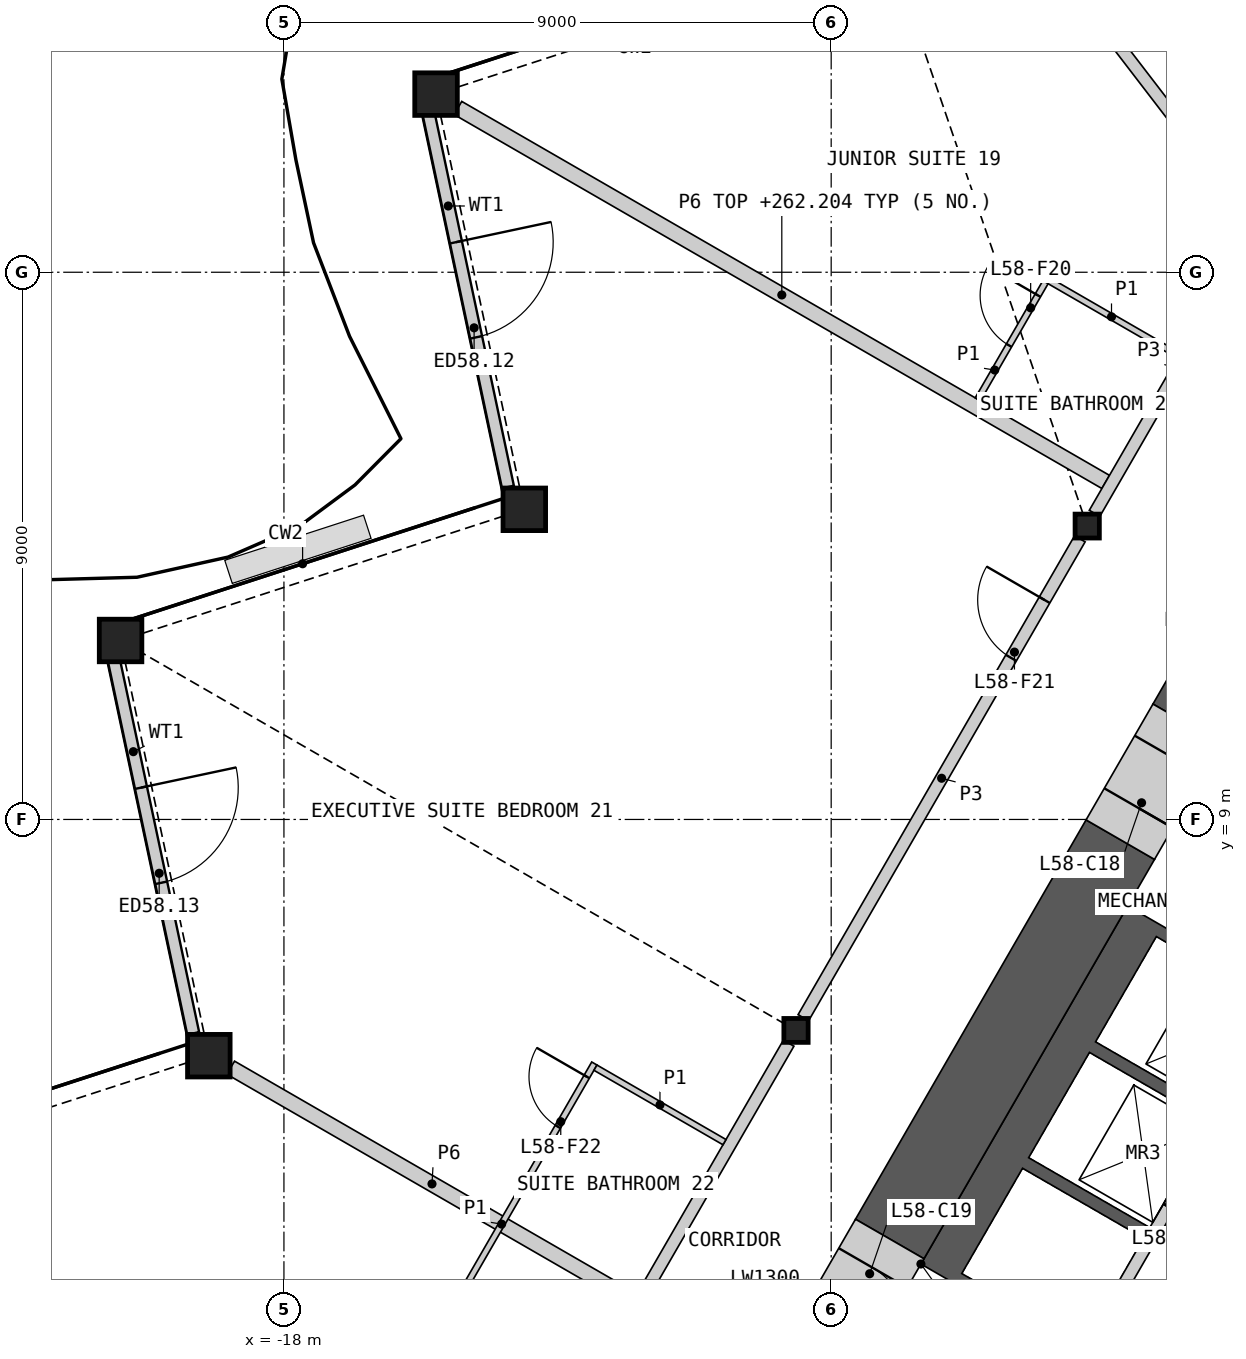
"""IFC4 building model, lengths in metres.
Left out: names, types, materials, properties, quantities, classifications, styles, units other than length and angle.
Written with IfcOpenShell. Run it as: python <this file> out.ifc"""

import sys

from ifc_helpers import new_model, si_unit, direction, frame, frame_2d, origin, origin_2d, place, context, subcontext, project, spatial, polyline, rectangle, hollow_rectangle, i_section, outline, extrude, element, fill, save


model = new_model("IFC4")
c1 = context("Model", 3, precision=1e-05, world=origin(), true_north=direction((0.0, 1.0)))
c2 = subcontext(c1, "Body", "Model", "MODEL_VIEW")
j1 = project(units=[si_unit("LENGTHUNIT", "METRE"), si_unit("PLANEANGLEUNIT", "RADIAN")], contexts=[c1])
p1 = place(None, origin())
s1 = spatial("IfcSite", under=j1, at=p1, CompositionType="ELEMENT")
p2 = place(p1, origin())
s2 = spatial("IfcBuilding", under=s1, at=p2, CompositionType="ELEMENT")
p3 = place(p2, frame((0.0, 0.0, 259.8)))
s3 = spatial("IfcBuildingStorey", under=s2, at=p3, CompositionType="ELEMENT", Elevation=259.8)
for number, where, z_axis, x_axis in (
    (1, (-15.499, 20.93, 0.0), (0.0, 0.0, 1.0), (1.0, 0.0, 0.0)),
    (2, (-14.047, 14.101, 0.0), (0.0, 0.0, 1.0), (1.0, 0.0, 0.0)),
    (3, (-20.687, 11.943, 0.0), (0.0, 0.0, 1.0), (1.0, 0.0, 0.0)),
    (4, (-19.235, 5.115, 0.0), (0.0, 0.0, 1.0), (1.0, 0.0, 0.0)),
):
    element("IfcColumn", number, at=place(p3, frame(where, z_axis=z_axis, x_axis=x_axis)), inside=s3, PredefinedType="COLUMN", context=c2, shape_type="SweptSolid", body=[
        extrude(hollow_rectangle(XDim=0.7, YDim=0.7, WallThickness=0.045, at=origin_2d()), origin(), (0.0, 0.0, 1.0), 3.6),
    ])
for number, where, z_axis, x_axis in (
    (5, (-4.789, 13.825, 0.0), (0.0, 0.0, 1.0), (1.0, 0.0, 0.0)),
    (6, (-9.578, 5.53, 0.0), (0.0, 0.0, 1.0), (1.0, 0.0, 0.0)),
):
    element("IfcColumn", number, at=place(p3, frame(where, z_axis=z_axis, x_axis=x_axis)), inside=s3, PredefinedType="COLUMN", context=c2, shape_type="SweptSolid", body=[
        extrude(i_section(OverallWidth=0.399, OverallDepth=0.393, WebThickness=0.023, FlangeThickness=0.037, at=origin_2d()), origin(), (0.0, 0.0, 1.0), 3.6),
    ])
p4 = place(p3, frame((-15.626, 20.631, 0.0), z_axis=(0.0, 0.0, 1.0), x_axis=(0.207882853761, -0.978153729795, 0.0)))
e7 = element("IfcWall", 7, at=p4, inside=s3, PredefinedType="SOLIDWALL", context=c2, shape_type="SweptSolid", body=[
    extrude(rectangle(XDim=6.301, YDim=0.2, at=frame_2d((3.15, 0.0))), origin(), (0.0, 0.0, 1.0), 2.701),
])
p5 = place(p4, frame((2.184, 0.0, 0.0)))
e8 = element("IfcOpeningElement", 8, at=p5, cuts=e7, PredefinedType="OPENING", context=c2, shape_type="SweptSolid", body=[
    extrude(rectangle(XDim=1.6, YDim=2.4, at=frame_2d((0.8, 1.2))), frame((0.0, 0.11, 0.0), z_axis=(0.0, -1.0, 0.0), x_axis=(1.0, 0.0, 0.0)), (0.0, 0.0, 1.0), 0.22),
])
p6 = place(p3, frame((-20.805, 11.659, 0.0), z_axis=(0.0, 0.0, 1.0), x_axis=(0.207913305093, -0.978147257608, 0.0)))
e9 = element("IfcWall", 9, at=p6, inside=s3, PredefinedType="SOLIDWALL", context=c2, shape_type="SweptSolid", body=[
    extrude(rectangle(XDim=6.316, YDim=0.2, at=frame_2d((3.158, 0.0))), origin(), (0.0, 0.0, 1.0), 2.701),
])
p7 = place(p6, frame((2.184, 0.0, 0.0)))
e10 = element("IfcOpeningElement", 10, at=p7, cuts=e9, PredefinedType="OPENING", context=c2, shape_type="SweptSolid", body=[
    extrude(rectangle(XDim=1.6, YDim=2.4, at=frame_2d((0.8, 1.2))), frame((0.0, 0.11, 0.0), z_axis=(0.0, -1.0, 0.0), x_axis=(1.0, 0.0, 0.0)), (0.0, 0.0, 1.0), 0.22),
])
p8 = place(p3, origin())
e11 = element("IfcWall", 11, at=p8, inside=s3, PredefinedType="SHEAR", context=c2, shape_type="SweptSolid", body=[
    extrude(outline(polyline([(-7.524, 1.688), (-4.124, 7.577), (-3.731, 7.35), (-1.561, 6.097), (-1.66, 5.924), (-3.652, 7.074), (-4.652, 5.342), (-2.66, 4.192), (-2.76, 4.019), (-4.752, 5.169), (-5.752, 3.437), (-3.76, 2.287), (-3.861, 2.113), (-5.852, 3.263), (-6.852, 1.531), (-4.861, 0.381), (-4.96, 0.208), (-7.131, 1.461), (-7.524, 1.688)])), origin(), (0.0, 0.0, 1.0), 3.25),
])
p9 = place(p3, frame((-1.631, 5.776, 0.0), z_axis=(0.0, 0.0, 1.0), x_axis=(-0.499992876559, -0.866029516466, 0.0)))
e12 = element("IfcWall", 12, at=p9, inside=s3, PredefinedType="SOLIDWALL", context=c2, shape_type="SweptSolid", body=[
    extrude(rectangle(XDim=6.486, YDim=0.2, at=frame_2d((3.243, 0.0))), origin(), (0.0, 0.0, 1.0), 3.25),
])
p10 = place(p9, frame((0.337, 0.0, 0.0)))
e13 = element("IfcOpeningElement", 13, at=p10, cuts=e12, PredefinedType="OPENING", context=c2, shape_type="SweptSolid", body=[
    extrude(rectangle(XDim=1.1, YDim=2.1, at=frame_2d((0.55, 1.05))), frame((0.0, 0.11, 0.0), z_axis=(0.0, -1.0, 0.0), x_axis=(1.0, 0.0, 0.0)), (0.0, 0.0, 1.0), 0.22),
])
p11 = place(p9, frame((2.537, 0.0, 0.0)))
e14 = element("IfcOpeningElement", 14, at=p11, cuts=e12, PredefinedType="OPENING", context=c2, shape_type="SweptSolid", body=[
    extrude(rectangle(XDim=1.1, YDim=2.1, at=frame_2d((0.55, 1.05))), frame((0.0, 0.11, 0.0), z_axis=(0.0, -1.0, 0.0), x_axis=(1.0, 0.0, 0.0)), (0.0, 0.0, 1.0), 0.22),
])
p12 = place(p3, frame((-4.245, 8.668, 0.0), z_axis=(0.0, 0.0, 1.0), x_axis=(-0.500002971097, -0.866023688414, 0.0)))
e15 = element("IfcWall", 15, at=p12, inside=s3, PredefinedType="SHEAR", context=c2, shape_type="SweptSolid", body=[
    extrude(rectangle(XDim=7.584, YDim=1.3, at=frame_2d((3.792, 0.0))), origin(), (0.0, 0.0, 1.0), 3.25),
])
p13 = place(p3, frame((-0.563, 15.045, 0.0), z_axis=(0.0, 0.0, 1.0), x_axis=(-0.499982995661, -0.866035221021, 0.0)))
e16 = element("IfcWall", 16, at=p13, inside=s3, PredefinedType="SHEAR", context=c2, shape_type="SweptSolid", body=[
    extrude(rectangle(XDim=5.164, YDim=1.3, at=frame_2d((2.582, 0.0))), origin(), (0.0, 0.0, 1.0), 3.25),
])
p14 = place(p3, frame((-3.145, 10.573, 0.0), z_axis=(0.0, 0.0, 1.0), x_axis=(-0.50002983664, -0.866008176907, 0.0)))
e17 = element("IfcWall", 17, at=p14, inside=s3, PredefinedType="SHEAR", context=c2, shape_type="SweptSolid", body=[
    extrude(rectangle(XDim=2.2, YDim=1.3, at=frame_2d((1.1, 0.0))), origin(), (0.0, 0.0, 1.0), 3.25),
])
p15 = place(p14, frame((0.6, 0.0, 0.0)))
e18 = element("IfcOpeningElement", 18, at=p15, cuts=e17, PredefinedType="OPENING", context=c2, shape_type="SweptSolid", body=[
    extrude(rectangle(XDim=1.0, YDim=2.1, at=frame_2d((0.5, 1.05))), frame((0.0, 0.66, 0.0), z_axis=(0.0, -1.0, 0.0), x_axis=(1.0, 0.0, 0.0)), (0.0, 0.0, 1.0), 1.32),
])
p16 = place(p3, frame((-8.037, 2.1, 0.0), z_axis=(0.0, 0.0, 1.0), x_axis=(-0.50002983664, -0.866008176907, 0.0)))
e19 = element("IfcWall", 19, at=p16, inside=s3, PredefinedType="SHEAR", context=c2, shape_type="SweptSolid", body=[
    extrude(rectangle(XDim=2.2, YDim=1.3, at=frame_2d((1.1, 0.0))), origin(), (0.0, 0.0, 1.0), 3.25),
])
p17 = place(p16, frame((0.55, 0.0, 0.0)))
e20 = element("IfcOpeningElement", 20, at=p17, cuts=e19, PredefinedType="OPENING", context=c2, shape_type="SweptSolid", body=[
    extrude(rectangle(XDim=1.1, YDim=2.1, at=frame_2d((0.55, 1.05))), frame((0.0, 0.66, 0.0), z_axis=(0.0, -1.0, 0.0), x_axis=(1.0, 0.0, 0.0)), (0.0, 0.0, 1.0), 1.32),
])
p18 = place(p3, frame((-15.138, 20.702, 0.0), z_axis=(0.0, 0.0, 1.0), x_axis=(0.86602627735, -0.499998486937, 0.0)))
e21 = element("IfcWall", 21, at=p18, inside=s3, PredefinedType="PARTITIONING", context=c2, shape_type="SweptSolid", body=[
    extrude(rectangle(XDim=12.301, YDim=0.25, at=frame_2d((6.15, 0.0))), origin(), (0.0, 0.0, 1.0), 2.404),
])
p19 = place(p3, frame((-14.247, -2.556, 0.0), z_axis=(0.0, 0.0, 1.0), x_axis=(0.49998193945, 0.866035830797, 0.0)))
e22 = element("IfcWall", 22, at=p19, inside=s3, PredefinedType="PARTITIONING", context=c2, shape_type="SweptSolid", body=[
    extrude(rectangle(XDim=9.094, YDim=0.2, at=frame_2d((4.547, 0.0))), origin(), (0.0, 0.0, 1.0), 3.25),
])
p20 = place(p3, frame((-9.458, 5.74, 0.0), z_axis=(0.0, 0.0, 1.0), x_axis=(0.50000207303, 0.866024206917, 0.0)))
e23 = element("IfcWall", 23, at=p20, inside=s3, PredefinedType="PARTITIONING", context=c2, shape_type="SweptSolid", body=[
    extrude(rectangle(XDim=9.095, YDim=0.2, at=frame_2d((4.547, 0.0))), origin(), (0.0, 0.0, 1.0), 3.25),
])
p21 = place(p20, frame((6.833, 0.0, 0.0)))
e24 = element("IfcOpeningElement", 24, at=p21, cuts=e23, PredefinedType="OPENING", context=c2, shape_type="SweptSolid", body=[
    extrude(rectangle(XDim=1.1, YDim=2.1, at=frame_2d((0.55, 1.05))), frame((0.0, 0.11, 0.0), z_axis=(0.0, -1.0, 0.0), x_axis=(1.0, 0.0, 0.0)), (0.0, 0.0, 1.0), 0.22),
])
p22 = place(p3, frame((-18.875, 4.917, 0.0), z_axis=(0.0, 0.0, 1.0), x_axis=(0.866017519557, -0.500013655634, 0.0)))
e25 = element("IfcWall", 25, at=p22, inside=s3, PredefinedType="PARTITIONING", context=c2, shape_type="SweptSolid", body=[
    extrude(rectangle(XDim=7.644, YDim=0.25, at=frame_2d((3.822, 0.0))), origin(), (0.0, 0.0, 1.0), 2.404),
])
p23 = place(p3, frame((-4.668, 14.035, 0.0), z_axis=(0.0, 0.0, 1.0), x_axis=(0.499984524817, 0.866034338201, 0.0)))
e26 = element("IfcWall", 26, at=p23, inside=s3, PredefinedType="PARTITIONING", context=c2, shape_type="SweptSolid", body=[
    extrude(rectangle(XDim=5.51, YDim=0.2, at=frame_2d((2.755, 0.0))), origin(), (0.0, 0.0, 1.0), 3.25),
])
p24 = place(p23, frame((4.01, 0.0, 0.0)))
e27 = element("IfcOpeningElement", 27, at=p24, cuts=e26, PredefinedType="OPENING", context=c2, shape_type="SweptSolid", body=[
    extrude(rectangle(XDim=1.1, YDim=2.1, at=frame_2d((0.55, 1.05))), frame((0.0, 0.11, 0.0), z_axis=(0.0, -1.0, 0.0), x_axis=(1.0, 0.0, 0.0)), (0.0, 0.0, 1.0), 0.22),
])
p25 = place(p3, frame((-10.277, 29.556, 0.0), z_axis=(0.0, 0.0, 1.0), x_axis=(0.60876001101, -0.793354428358, 0.0)))
e28 = element("IfcWall", 28, at=p25, inside=s3, PredefinedType="PARTITIONING", context=c2, shape_type="SweptSolid", body=[
    extrude(rectangle(XDim=13.558, YDim=0.2, at=frame_2d((6.779, 0.0))), origin(), (0.0, 0.0, 1.0), 2.404),
])
p26 = place(p3, frame((-15.945, -0.297, 0.0), z_axis=(0.0, 0.0, 1.0), x_axis=(0.499978833458, 0.866037623948, 0.0)))
e29 = element("IfcWall", 29, at=p26, inside=s3, PredefinedType="PARTITIONING", context=c2, shape_type="SweptSolid", body=[
    extrude(rectangle(XDim=6.1, YDim=0.1, at=frame_2d((3.05, 0.0))), origin(), (0.0, 0.0, 1.0), 2.404),
])
p27 = place(p26, frame((4.9, 0.0, 0.0)))
e30 = element("IfcOpeningElement", 30, at=p27, cuts=e29, PredefinedType="OPENING", context=c2, shape_type="SweptSolid", body=[
    extrude(rectangle(XDim=0.95, YDim=2.1, at=frame_2d((0.475, 1.05))), frame((0.0, 0.06, 0.0), z_axis=(0.0, -1.0, 0.0), x_axis=(1.0, 0.0, 0.0)), (0.0, 0.0, 1.0), 0.12),
])
p28 = place(p26, frame((0.25, 0.0, 0.0)))
e31 = element("IfcOpeningElement", 31, at=p28, cuts=e29, PredefinedType="OPENING", context=c2, shape_type="SweptSolid", body=[
    extrude(rectangle(XDim=0.95, YDim=2.1, at=frame_2d((0.475, 1.05))), frame((0.0, 0.06, 0.0), z_axis=(0.0, -1.0, 0.0), x_axis=(1.0, 0.0, 0.0)), (0.0, 0.0, 1.0), 0.12),
])
p29 = place(p3, frame((-12.877, 4.917, 0.0), z_axis=(0.0, 0.0, 1.0), x_axis=(0.866057815567, -0.499943856944, 0.0)))
e32 = element("IfcWall", 32, at=p29, inside=s3, PredefinedType="PARTITIONING", context=c2, shape_type="SweptSolid", body=[
    extrude(rectangle(XDim=2.45, YDim=0.1, at=frame_2d((1.225, 0.0))), origin(), (0.0, 0.0, 1.0), 2.404),
])
p30 = place(p3, frame((-5.494, 17.905, 0.0), z_axis=(0.0, 0.0, 1.0), x_axis=(0.866030925526, -0.499990435942, 0.0)))
e33 = element("IfcWall", 33, at=p30, inside=s3, PredefinedType="PARTITIONING", context=c2, shape_type="SweptSolid", body=[
    extrude(rectangle(XDim=2.55, YDim=0.1, at=frame_2d((1.275, 0.0))), origin(), (0.0, 0.0, 1.0), 2.404),
])
p31 = place(p3, frame((-6.588, 15.909, 0.0), z_axis=(0.0, 0.0, 1.0), x_axis=(0.49999788721, 0.866026623601, 0.0)))
e34 = element("IfcWall", 34, at=p31, inside=s3, PredefinedType="PARTITIONING", context=c2, shape_type="SweptSolid", body=[
    extrude(rectangle(XDim=2.225, YDim=0.1, at=frame_2d((1.113, 0.0))), origin(), (0.0, 0.0, 1.0), 2.404),
])
p32 = place(p31, frame((1.025, 0.0, 0.0)))
e35 = element("IfcOpeningElement", 35, at=p32, cuts=e34, PredefinedType="OPENING", context=c2, shape_type="SweptSolid", body=[
    extrude(rectangle(XDim=0.95, YDim=2.1, at=frame_2d((0.475, 1.05))), frame((0.0, 0.06, 0.0), z_axis=(0.0, -1.0, 0.0), x_axis=(1.0, 0.0, 0.0)), (0.0, 0.0, 1.0), 0.12),
])
p33 = place(p5, origin())
e36 = element("IfcDoor", 36, at=p33, inside=s3, OperationType="DOUBLE_DOOR_SINGLE_SWING", PredefinedType="DOOR", context=c2, shape_type="SweptSolid", body=[
    extrude(rectangle(XDim=1.6, YDim=2.4, at=frame_2d((0.8, 1.2))), frame((0.0, 0.025, 0.0), z_axis=(0.0, -1.0, 0.0), x_axis=(1.0, 0.0, 0.0)), (0.0, 0.0, 1.0), 0.05),
])
fill(e8, e36)
p34 = place(p7, origin())
e37 = element("IfcDoor", 37, at=p34, inside=s3, OperationType="DOUBLE_DOOR_SINGLE_SWING", PredefinedType="DOOR", context=c2, shape_type="SweptSolid", body=[
    extrude(rectangle(XDim=1.6, YDim=2.4, at=frame_2d((0.8, 1.2))), frame((0.0, 0.025, 0.0), z_axis=(0.0, -1.0, 0.0), x_axis=(1.0, 0.0, 0.0)), (0.0, 0.0, 1.0), 0.05),
])
fill(e10, e37)
p35 = place(p15, origin())
e38 = element("IfcDoor", 38, at=p35, inside=s3, OperationType="SINGLE_SWING_RIGHT", PredefinedType="DOOR", context=c2, shape_type="SweptSolid", body=[
    extrude(rectangle(XDim=1.0, YDim=2.1, at=frame_2d((0.5, 1.05))), frame((0.0, 0.405, 0.0), z_axis=(0.0, -1.0, 0.0), x_axis=(1.0, 0.0, 0.0)), (0.0, 0.0, 1.0), 0.05),
])
fill(e18, e38)
p36 = place(p32, origin())
e39 = element("IfcDoor", 39, at=p36, inside=s3, OperationType="SINGLE_SWING_RIGHT", PredefinedType="DOOR", context=c2, shape_type="SweptSolid", body=[
    extrude(rectangle(XDim=0.95, YDim=2.1, at=frame_2d((0.475, 1.05))), frame((0.0, 0.025, 0.0), z_axis=(0.0, -1.0, 0.0), x_axis=(1.0, 0.0, 0.0)), (0.0, 0.0, 1.0), 0.05),
])
fill(e35, e39)
p37 = place(p21, origin())
e40 = element("IfcDoor", 40, at=p37, inside=s3, OperationType="SINGLE_SWING_RIGHT", PredefinedType="DOOR", context=c2, shape_type="SweptSolid", body=[
    extrude(rectangle(XDim=1.1, YDim=2.1, at=frame_2d((0.55, 1.05))), frame((0.0, 0.025, 0.0), z_axis=(0.0, -1.0, 0.0), x_axis=(1.0, 0.0, 0.0)), (0.0, 0.0, 1.0), 0.05),
])
fill(e24, e40)
p38 = place(p27, origin())
e41 = element("IfcDoor", 41, at=p38, inside=s3, OperationType="SINGLE_SWING_RIGHT", PredefinedType="DOOR", context=c2, shape_type="SweptSolid", body=[
    extrude(rectangle(XDim=0.95, YDim=2.1, at=frame_2d((0.475, 1.05))), frame((0.0, 0.025, 0.0), z_axis=(0.0, -1.0, 0.0), x_axis=(1.0, 0.0, 0.0)), (0.0, 0.0, 1.0), 0.05),
])
fill(e30, e41)
save(model, sys.argv[1])
